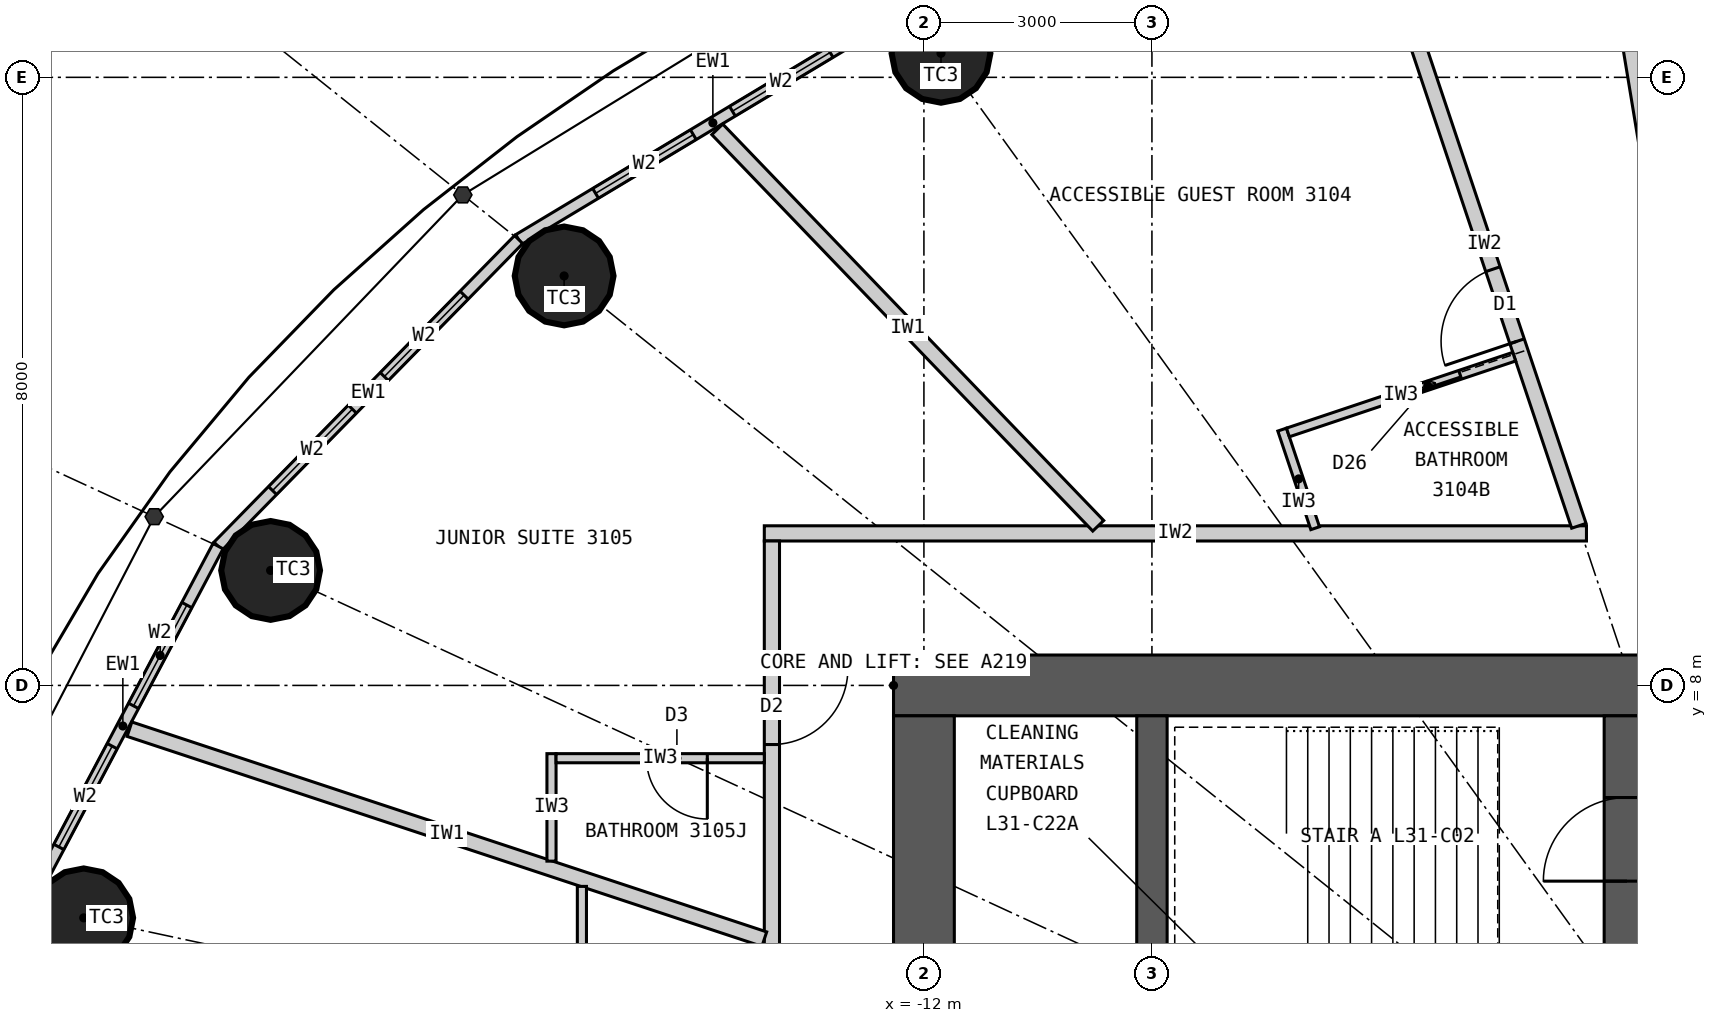
"""IFC4 building model, lengths in metres.
Left out: names, types, materials, properties, quantities, classifications, styles, units other than length and angle.
Written with IfcOpenShell. Run it as: python <this file> out.ifc"""

import sys

from ifc_helpers import new_model, si_unit, direction, frame, frame_2d, origin, origin_2d, place, context, subcontext, project, spatial, rectangle, circle, extrude, element, fill, save


model = new_model("IFC4")
c1 = context("Model", 3, precision=1e-05, world=origin(), true_north=direction((0.0, 1.0)))
c2 = subcontext(c1, "Body", "Model", "MODEL_VIEW")
j1 = project(units=[si_unit("LENGTHUNIT", "METRE"), si_unit("PLANEANGLEUNIT", "RADIAN")], contexts=[c1])
p1 = place(None, origin())
s1 = spatial("IfcSite", under=j1, at=p1, CompositionType="ELEMENT")
p2 = place(p1, origin())
s2 = spatial("IfcBuilding", under=s1, at=p2, CompositionType="ELEMENT")
p3 = place(p2, frame((0.0, 0.0, 122.1)))
s3 = spatial("IfcBuildingStorey", under=s2, at=p3, CompositionType="ELEMENT", Elevation=122.1)
for number, where, z_axis, x_axis in (
    (1, (-11.775, 16.316, 0.0), (0.0, 0.0, 1.0), (1.0, 0.0, 0.0)),
    (2, (-16.734, 13.387, 0.0), (0.0, 0.0, 1.0), (1.0, 0.0, 0.0)),
    (3, (-20.596, 9.513, 0.0), (0.0, 0.0, 1.0), (1.0, 0.0, 0.0)),
    (4, (-23.055, 4.942, 0.0), (0.0, 0.0, 1.0), (1.0, 0.0, 0.0)),
):
    element("IfcColumn", number, at=place(p3, frame(where, z_axis=z_axis, x_axis=x_axis)), inside=s3, PredefinedType="COLUMN", context=c2, shape_type="SweptSolid", body=[
        extrude(circle(Radius=0.65, at=origin_2d()), origin(), (0.0, 0.0, 1.0), 3.3),
    ])
p4 = place(p3, frame((-12.4, 8.0, 0.0), z_axis=(0.0, 0.0, 1.0), x_axis=(1.0, 0.0, 0.0)))
e5 = element("IfcWall", 5, at=p4, inside=s3, PredefinedType="SHEAR", context=c2, shape_type="SweptSolid", body=[
    extrude(rectangle(XDim=24.8, YDim=0.8, at=frame_2d((12.4, 0.0))), origin(), (0.0, 0.0, 1.0), 3.3),
])
p5 = place(p4, frame((11.1, 0.0, 0.0)))
e6 = element("IfcOpeningElement", 6, at=p5, cuts=e5, PredefinedType="OPENING", context=c2, shape_type="SweptSolid", body=[
    extrude(rectangle(XDim=1.2, YDim=2.2, at=frame_2d((0.6, 1.1))), frame((0.0, 0.41, 0.0), z_axis=(0.0, -1.0, 0.0), x_axis=(1.0, 0.0, 0.0)), (0.0, 0.0, 1.0), 0.82),
])
p6 = place(p4, frame((18.7, 0.0, 0.0)))
e7 = element("IfcOpeningElement", 7, at=p6, cuts=e5, PredefinedType="OPENING", context=c2, shape_type="SweptSolid", body=[
    extrude(rectangle(XDim=0.9, YDim=2.2, at=frame_2d((0.45, 1.1))), frame((0.0, 0.41, 0.0), z_axis=(0.0, -1.0, 0.0), x_axis=(1.0, 0.0, 0.0)), (0.0, 0.0, 1.0), 0.82),
])
p7 = place(p3, frame((-12.0, 7.6, 0.0), z_axis=(0.0, 0.0, 1.0), x_axis=(0.0, -1.0, 0.0)))
e8 = element("IfcWall", 8, at=p7, inside=s3, PredefinedType="SHEAR", context=c2, shape_type="SweptSolid", body=[
    extrude(rectangle(XDim=15.2, YDim=0.8, at=frame_2d((7.6, 0.0))), origin(), (0.0, 0.0, 1.0), 3.3),
])
p8 = place(p7, frame((6.7, 0.0, 0.0)))
e9 = element("IfcOpeningElement", 9, at=p8, cuts=e8, PredefinedType="OPENING", context=c2, shape_type="SweptSolid", body=[
    extrude(rectangle(XDim=1.8, YDim=2.2, at=frame_2d((0.9, 1.1))), frame((0.0, 0.41, 0.0), z_axis=(0.0, -1.0, 0.0), x_axis=(1.0, 0.0, 0.0)), (0.0, 0.0, 1.0), 0.82),
])
p9 = place(p3, frame((-9.0, 4.5, 0.0), z_axis=(0.0, 0.0, 1.0), x_axis=(0.0, 1.0, 0.0)))
e10 = element("IfcWall", 10, at=p9, inside=s3, PredefinedType="SHEAR", context=c2, shape_type="SweptSolid", body=[
    extrude(rectangle(XDim=3.1, YDim=0.4, at=frame_2d((1.55, 0.0))), origin(), (0.0, 0.0, 1.0), 3.3),
])
p10 = place(p3, frame((-2.75, 4.5, 0.0), z_axis=(0.0, 0.0, 1.0), x_axis=(0.0, 1.0, 0.0)))
e11 = element("IfcWall", 11, at=p10, inside=s3, PredefinedType="SHEAR", context=c2, shape_type="SweptSolid", body=[
    extrude(rectangle(XDim=3.1, YDim=0.6, at=frame_2d((1.55, 0.0))), origin(), (0.0, 0.0, 1.0), 3.3),
])
p11 = place(p10, frame((0.925, 0.0, 0.0)))
e12 = element("IfcOpeningElement", 12, at=p11, cuts=e11, PredefinedType="OPENING", context=c2, shape_type="SweptSolid", body=[
    extrude(rectangle(XDim=1.1, YDim=2.2, at=frame_2d((0.55, 1.1))), frame((0.0, 0.31, 0.0), z_axis=(0.0, -1.0, 0.0), x_axis=(1.0, 0.0, 0.0)), (0.0, 0.0, 1.0), 0.62),
])
p12 = place(p3, frame((-12.221, 16.935, 0.0), z_axis=(0.0, 0.0, 1.0), x_axis=(-0.857308573723, -0.514802884044, 0.0)))
e13 = element("IfcWall", 13, at=p12, inside=s3, PredefinedType="ELEMENTEDWALL", context=c2, shape_type="SweptSolid", body=[
    extrude(rectangle(XDim=5.961, YDim=0.15, at=frame_2d((2.98, 0.0))), origin(), (0.0, 0.0, 1.0), 3.12),
])
p13 = place(p12, frame((1.181, 0.0, 0.9)))
e14 = element("IfcOpeningElement", 14, at=p13, cuts=e13, PredefinedType="OPENING", context=c2, shape_type="SweptSolid", body=[
    extrude(rectangle(XDim=1.5, YDim=1.9, at=frame_2d((0.75, 0.95))), frame((0.0, 0.085, 0.0), z_axis=(0.0, -1.0, 0.0), x_axis=(1.0, 0.0, 0.0)), (0.0, 0.0, 1.0), 0.17),
])
p14 = place(p12, frame((3.281, 0.0, 0.9)))
e15 = element("IfcOpeningElement", 15, at=p14, cuts=e13, PredefinedType="OPENING", context=c2, shape_type="SweptSolid", body=[
    extrude(rectangle(XDim=1.5, YDim=1.9, at=frame_2d((0.75, 0.95))), frame((0.0, 0.085, 0.0), z_axis=(0.0, -1.0, 0.0), x_axis=(1.0, 0.0, 0.0)), (0.0, 0.0, 1.0), 0.17),
])
p15 = place(p3, frame((-17.332, 13.866, 0.0), z_axis=(0.0, 0.0, 1.0), x_axis=(-0.700136650834, -0.714008872605, 0.0)))
e16 = element("IfcWall", 16, at=p15, inside=s3, PredefinedType="ELEMENTEDWALL", context=c2, shape_type="SweptSolid", body=[
    extrude(rectangle(XDim=5.649, YDim=0.15, at=frame_2d((2.825, 0.0))), origin(), (0.0, 0.0, 1.0), 3.12),
])
p16 = place(p15, frame((1.025, 0.0, 0.9)))
e17 = element("IfcOpeningElement", 17, at=p16, cuts=e16, PredefinedType="OPENING", context=c2, shape_type="SweptSolid", body=[
    extrude(rectangle(XDim=1.5, YDim=1.9, at=frame_2d((0.75, 0.95))), frame((0.0, 0.085, 0.0), z_axis=(0.0, -1.0, 0.0), x_axis=(1.0, 0.0, 0.0)), (0.0, 0.0, 1.0), 0.17),
])
p17 = place(p15, frame((3.125, 0.0, 0.9)))
e18 = element("IfcOpeningElement", 18, at=p17, cuts=e16, PredefinedType="OPENING", context=c2, shape_type="SweptSolid", body=[
    extrude(rectangle(XDim=1.5, YDim=1.9, at=frame_2d((0.75, 0.95))), frame((0.0, 0.085, 0.0), z_axis=(0.0, -1.0, 0.0), x_axis=(1.0, 0.0, 0.0)), (0.0, 0.0, 1.0), 0.17),
])
p18 = place(p3, frame((-21.287, 9.832, 0.0), z_axis=(0.0, 0.0, 1.0), x_axis=(-0.467814388454, -0.883826735257, 0.0)))
e19 = element("IfcWall", 19, at=p18, inside=s3, PredefinedType="ELEMENTEDWALL", context=c2, shape_type="SweptSolid", body=[
    extrude(rectangle(XDim=5.354, YDim=0.15, at=frame_2d((2.677, 0.0))), origin(), (0.0, 0.0, 1.0), 3.12),
])
p19 = place(p18, frame((0.877, 0.0, 0.9)))
e20 = element("IfcOpeningElement", 20, at=p19, cuts=e19, PredefinedType="OPENING", context=c2, shape_type="SweptSolid", body=[
    extrude(rectangle(XDim=1.5, YDim=1.9, at=frame_2d((0.75, 0.95))), frame((0.0, 0.085, 0.0), z_axis=(0.0, -1.0, 0.0), x_axis=(1.0, 0.0, 0.0)), (0.0, 0.0, 1.0), 0.17),
])
p20 = place(p18, frame((2.977, 0.0, 0.9)))
e21 = element("IfcOpeningElement", 21, at=p20, cuts=e19, PredefinedType="OPENING", context=c2, shape_type="SweptSolid", body=[
    extrude(rectangle(XDim=1.5, YDim=1.9, at=frame_2d((0.75, 0.95))), frame((0.0, 0.085, 0.0), z_axis=(0.0, -1.0, 0.0), x_axis=(1.0, 0.0, 0.0)), (0.0, 0.0, 1.0), 0.17),
])
p21 = place(p3, frame((-14.1, 10.0, 0.0), z_axis=(0.0, 0.0, 1.0), x_axis=(1.0, 0.0, 0.0)))
e22 = element("IfcWall", 22, at=p21, inside=s3, PredefinedType="PARTITIONING", context=c2, shape_type="SweptSolid", body=[
    extrude(rectangle(XDim=10.817, YDim=0.2, at=frame_2d((5.409, 0.0))), origin(), (0.0, 0.0, 1.0), 3.12),
])
p22 = place(p3, frame((-14.0, 9.9, 0.0), z_axis=(0.0, 0.0, 1.0), x_axis=(0.0, -1.0, 0.0)))
e23 = element("IfcWall", 23, at=p22, inside=s3, PredefinedType="PARTITIONING", context=c2, shape_type="SweptSolid", body=[
    extrude(rectangle(XDim=19.8, YDim=0.2, at=frame_2d((9.9, 0.0))), origin(), (0.0, 0.0, 1.0), 3.12),
])
p23 = place(p22, frame((1.678, 0.0, 0.0)))
e24 = element("IfcOpeningElement", 24, at=p23, cuts=e23, PredefinedType="OPENING", context=c2, shape_type="SweptSolid", body=[
    extrude(rectangle(XDim=1.0, YDim=2.2, at=frame_2d((0.5, 1.1))), frame((0.0, 0.11, 0.0), z_axis=(0.0, -1.0, 0.0), x_axis=(1.0, 0.0, 0.0)), (0.0, 0.0, 1.0), 0.22),
])
p24 = place(p22, frame((7.598, 0.0, 0.0)))
e25 = element("IfcOpeningElement", 25, at=p24, cuts=e23, PredefinedType="OPENING", context=c2, shape_type="SweptSolid", body=[
    extrude(rectangle(XDim=1.0, YDim=2.2, at=frame_2d((0.5, 1.1))), frame((0.0, 0.11, 0.0), z_axis=(0.0, -1.0, 0.0), x_axis=(1.0, 0.0, 0.0)), (0.0, 0.0, 1.0), 0.22),
])
p25 = place(p22, frame((12.26, 0.0, 0.0)))
e26 = element("IfcOpeningElement", 26, at=p25, cuts=e23, PredefinedType="OPENING", context=c2, shape_type="SweptSolid", body=[
    extrude(rectangle(XDim=1.0, YDim=2.2, at=frame_2d((0.5, 1.1))), frame((0.0, 0.11, 0.0), z_axis=(0.0, -1.0, 0.0), x_axis=(1.0, 0.0, 0.0)), (0.0, 0.0, 1.0), 0.22),
])
p26 = place(p22, frame((16.922, 0.0, 0.0)))
e27 = element("IfcOpeningElement", 27, at=p26, cuts=e23, PredefinedType="OPENING", context=c2, shape_type="SweptSolid", body=[
    extrude(rectangle(XDim=1.0, YDim=2.2, at=frame_2d((0.5, 1.1))), frame((0.0, 0.11, 0.0), z_axis=(0.0, -1.0, 0.0), x_axis=(1.0, 0.0, 0.0)), (0.0, 0.0, 1.0), 0.22),
])
p27 = place(p3, frame((-1.665, 10.1, 0.0), z_axis=(0.0, 0.0, 1.0), x_axis=(-0.162660519103, 0.986682094459, 0.0)))
e28 = element("IfcWall", 28, at=p27, inside=s3, PredefinedType="PARTITIONING", context=c2, shape_type="SweptSolid", body=[
    extrude(rectangle(XDim=9.111, YDim=0.2, at=frame_2d((4.555, 0.0))), origin(), (0.0, 0.0, 1.0), 3.12),
])
p28 = place(p3, frame((-3.383, 10.1, 0.0), z_axis=(0.0, 0.0, 1.0), x_axis=(-0.317603705574, 0.948223542318, 0.0)))
e29 = element("IfcWall", 29, at=p28, inside=s3, PredefinedType="PARTITIONING", context=c2, shape_type="SweptSolid", body=[
    extrude(rectangle(XDim=7.823, YDim=0.2, at=frame_2d((3.912, 0.0))), origin(), (0.0, 0.0, 1.0), 2.37),
])
p29 = place(p28, frame((2.56, 0.0, 0.0)))
e30 = element("IfcOpeningElement", 30, at=p29, cuts=e29, PredefinedType="OPENING", context=c2, shape_type="SweptSolid", body=[
    extrude(rectangle(XDim=1.0, YDim=2.2, at=frame_2d((0.5, 1.1))), frame((0.0, 0.11, 0.0), z_axis=(0.0, -1.0, 0.0), x_axis=(1.0, 0.0, 0.0)), (0.0, 0.0, 1.0), 0.22),
])
p30 = place(p3, frame((-9.706, 10.1, 0.0), z_axis=(0.0, 0.0, 1.0), x_axis=(-0.692944801824, 0.720990639069, 0.0)))
e31 = element("IfcWall", 31, at=p30, inside=s3, PredefinedType="PARTITIONING", context=c2, shape_type="SweptSolid", body=[
    extrude(rectangle(XDim=7.234, YDim=0.2, at=frame_2d((3.617, 0.0))), origin(), (0.0, 0.0, 1.0), 3.12),
])
p31 = place(p3, frame((-14.1, 4.662, 0.0), z_axis=(0.0, 0.0, 1.0), x_axis=(-0.949446466373, 0.313928984789, 0.0)))
e32 = element("IfcWall", 32, at=p31, inside=s3, PredefinedType="PARTITIONING", context=c2, shape_type="SweptSolid", body=[
    extrude(rectangle(XDim=8.797, YDim=0.2, at=frame_2d((4.399, 0.0))), origin(), (0.0, 0.0, 1.0), 3.12),
])
p32 = place(p3, frame((-6.852, 10.068, 0.0), z_axis=(0.0, 0.0, 1.0), x_axis=(-0.317619240343, 0.948218338867, 0.0)))
e33 = element("IfcWall", 33, at=p32, inside=s3, PredefinedType="PARTITIONING", context=c2, shape_type="SweptSolid", body=[
    extrude(rectangle(XDim=1.368, YDim=0.12, at=frame_2d((0.684, 0.0))), origin(), (0.0, 0.0, 1.0), 3.12),
])
p33 = place(p3, frame((-4.234, 12.325, 0.0), z_axis=(0.0, 0.0, 1.0), x_axis=(-0.948239154858, -0.317557089663, 0.0)))
e34 = element("IfcWall", 34, at=p33, inside=s3, PredefinedType="PARTITIONING", context=c2, shape_type="SweptSolid", body=[
    extrude(rectangle(XDim=3.14, YDim=0.12, at=frame_2d((1.57, 0.0))), origin(), (0.0, 0.0, 1.0), 3.12),
])
p34 = place(p33, frame((0.75, 0.0, 0.0)))
e35 = element("IfcOpeningElement", 35, at=p34, cuts=e34, PredefinedType="OPENING", context=c2, shape_type="SweptSolid", body=[
    extrude(rectangle(XDim=0.9, YDim=2.1, at=frame_2d((0.45, 1.05))), frame((0.0, 0.07, 0.0), z_axis=(0.0, -1.0, 0.0), x_axis=(1.0, 0.0, 0.0)), (0.0, 0.0, 1.0), 0.14),
])
p35 = place(p3, frame((-16.9, 5.688, 0.0), z_axis=(0.0, 0.0, 1.0), x_axis=(0.0, 1.0, 0.0)))
e36 = element("IfcWall", 36, at=p35, inside=s3, PredefinedType="PARTITIONING", context=c2, shape_type="SweptSolid", body=[
    extrude(rectangle(XDim=1.414, YDim=0.12, at=frame_2d((0.707, 0.0))), origin(), (0.0, 0.0, 1.0), 3.12),
])
p36 = place(p3, frame((-14.1, 7.042, 0.0), z_axis=(0.0, 0.0, 1.0), x_axis=(-1.0, 0.0, 0.0)))
e37 = element("IfcWall", 37, at=p36, inside=s3, PredefinedType="PARTITIONING", context=c2, shape_type="SweptSolid", body=[
    extrude(rectangle(XDim=2.74, YDim=0.12, at=frame_2d((1.37, 0.0))), origin(), (0.0, 0.0, 1.0), 3.12),
])
p37 = place(p36, frame((0.75, 0.0, 0.0)))
e38 = element("IfcOpeningElement", 38, at=p37, cuts=e37, PredefinedType="OPENING", context=c2, shape_type="SweptSolid", body=[
    extrude(rectangle(XDim=0.8, YDim=2.1, at=frame_2d((0.4, 1.05))), frame((0.0, 0.07, 0.0), z_axis=(0.0, -1.0, 0.0), x_axis=(1.0, 0.0, 0.0)), (0.0, 0.0, 1.0), 0.14),
])
p38 = place(p3, frame((-16.5, 5.356, 0.0), z_axis=(0.0, 0.0, 1.0), x_axis=(0.0, -1.0, 0.0)))
e39 = element("IfcWall", 39, at=p38, inside=s3, PredefinedType="PARTITIONING", context=c2, shape_type="SweptSolid", body=[
    extrude(rectangle(XDim=2.934, YDim=0.12, at=frame_2d((1.467, 0.0))), origin(), (0.0, 0.0, 1.0), 3.12),
])
p39 = place(p13, origin())
e40 = element("IfcWindow", 40, at=p39, inside=s3, PartitioningType="SINGLE_PANEL", PredefinedType="WINDOW", context=c2, shape_type="SweptSolid", body=[
    extrude(rectangle(XDim=1.5, YDim=1.9, at=frame_2d((0.75, 0.95))), frame((0.0, 0.03, 0.0), z_axis=(0.0, -1.0, 0.0), x_axis=(1.0, 0.0, 0.0)), (0.0, 0.0, 1.0), 0.06),
])
fill(e14, e40)
p40 = place(p14, origin())
e41 = element("IfcWindow", 41, at=p40, inside=s3, PartitioningType="SINGLE_PANEL", PredefinedType="WINDOW", context=c2, shape_type="SweptSolid", body=[
    extrude(rectangle(XDim=1.5, YDim=1.9, at=frame_2d((0.75, 0.95))), frame((0.0, 0.03, 0.0), z_axis=(0.0, -1.0, 0.0), x_axis=(1.0, 0.0, 0.0)), (0.0, 0.0, 1.0), 0.06),
])
fill(e15, e41)
p41 = place(p16, origin())
e42 = element("IfcWindow", 42, at=p41, inside=s3, PartitioningType="SINGLE_PANEL", PredefinedType="WINDOW", context=c2, shape_type="SweptSolid", body=[
    extrude(rectangle(XDim=1.5, YDim=1.9, at=frame_2d((0.75, 0.95))), frame((0.0, 0.03, 0.0), z_axis=(0.0, -1.0, 0.0), x_axis=(1.0, 0.0, 0.0)), (0.0, 0.0, 1.0), 0.06),
])
fill(e17, e42)
p42 = place(p17, origin())
e43 = element("IfcWindow", 43, at=p42, inside=s3, PartitioningType="SINGLE_PANEL", PredefinedType="WINDOW", context=c2, shape_type="SweptSolid", body=[
    extrude(rectangle(XDim=1.5, YDim=1.9, at=frame_2d((0.75, 0.95))), frame((0.0, 0.03, 0.0), z_axis=(0.0, -1.0, 0.0), x_axis=(1.0, 0.0, 0.0)), (0.0, 0.0, 1.0), 0.06),
])
fill(e18, e43)
p43 = place(p19, origin())
e44 = element("IfcWindow", 44, at=p43, inside=s3, PartitioningType="SINGLE_PANEL", PredefinedType="WINDOW", context=c2, shape_type="SweptSolid", body=[
    extrude(rectangle(XDim=1.5, YDim=1.9, at=frame_2d((0.75, 0.95))), frame((0.0, 0.03, 0.0), z_axis=(0.0, -1.0, 0.0), x_axis=(1.0, 0.0, 0.0)), (0.0, 0.0, 1.0), 0.06),
])
fill(e20, e44)
p44 = place(p20, origin())
e45 = element("IfcWindow", 45, at=p44, inside=s3, PartitioningType="SINGLE_PANEL", PredefinedType="WINDOW", context=c2, shape_type="SweptSolid", body=[
    extrude(rectangle(XDim=1.5, YDim=1.9, at=frame_2d((0.75, 0.95))), frame((0.0, 0.03, 0.0), z_axis=(0.0, -1.0, 0.0), x_axis=(1.0, 0.0, 0.0)), (0.0, 0.0, 1.0), 0.06),
])
fill(e21, e45)
p45 = place(p34, origin())
e46 = element("IfcDoor", 46, at=p45, inside=s3, OperationType="SLIDING_TO_LEFT", PredefinedType="DOOR", context=c2, shape_type="SweptSolid", body=[
    extrude(rectangle(XDim=0.9, YDim=2.1, at=frame_2d((0.45, 1.05))), frame((0.0, 0.025, 0.0), z_axis=(0.0, -1.0, 0.0), x_axis=(1.0, 0.0, 0.0)), (0.0, 0.0, 1.0), 0.05),
])
fill(e35, e46)
p46 = place(p29, origin())
e47 = element("IfcDoor", 47, at=p46, inside=s3, OperationType="SINGLE_SWING_LEFT", PredefinedType="DOOR", context=c2, shape_type="SweptSolid", body=[
    extrude(rectangle(XDim=1.0, YDim=2.2, at=frame_2d((0.5, 1.1))), frame((0.0, 0.025, 0.0), z_axis=(0.0, -1.0, 0.0), x_axis=(1.0, 0.0, 0.0)), (0.0, 0.0, 1.0), 0.05),
])
fill(e30, e47)
p47 = place(p37, origin())
e48 = element("IfcDoor", 48, at=p47, inside=s3, OperationType="SINGLE_SWING_LEFT", PredefinedType="DOOR", context=c2, shape_type="SweptSolid", body=[
    extrude(rectangle(XDim=0.8, YDim=2.1, at=frame_2d((0.4, 1.05))), frame((0.0, 0.025, 0.0), z_axis=(0.0, -1.0, 0.0), x_axis=(1.0, 0.0, 0.0)), (0.0, 0.0, 1.0), 0.05),
])
fill(e38, e48)
p48 = place(p23, origin())
e49 = element("IfcDoor", 49, at=p48, inside=s3, OperationType="SINGLE_SWING_LEFT", PredefinedType="DOOR", context=c2, shape_type="SweptSolid", body=[
    extrude(rectangle(XDim=1.0, YDim=2.2, at=frame_2d((0.5, 1.1))), frame((0.0, 0.025, 0.0), z_axis=(0.0, -1.0, 0.0), x_axis=(1.0, 0.0, 0.0)), (0.0, 0.0, 1.0), 0.05),
])
fill(e24, e49)
p49 = place(p11, origin())
e50 = element("IfcDoor", 50, at=p49, inside=s3, OperationType="SINGLE_SWING_LEFT", PredefinedType="DOOR", context=c2, shape_type="SweptSolid", body=[
    extrude(rectangle(XDim=1.1, YDim=2.2, at=frame_2d((0.55, 1.1))), frame((0.0, 0.025, 0.0), z_axis=(0.0, -1.0, 0.0), x_axis=(1.0, 0.0, 0.0)), (0.0, 0.0, 1.0), 0.05),
])
fill(e12, e50)
save(model, sys.argv[1])
